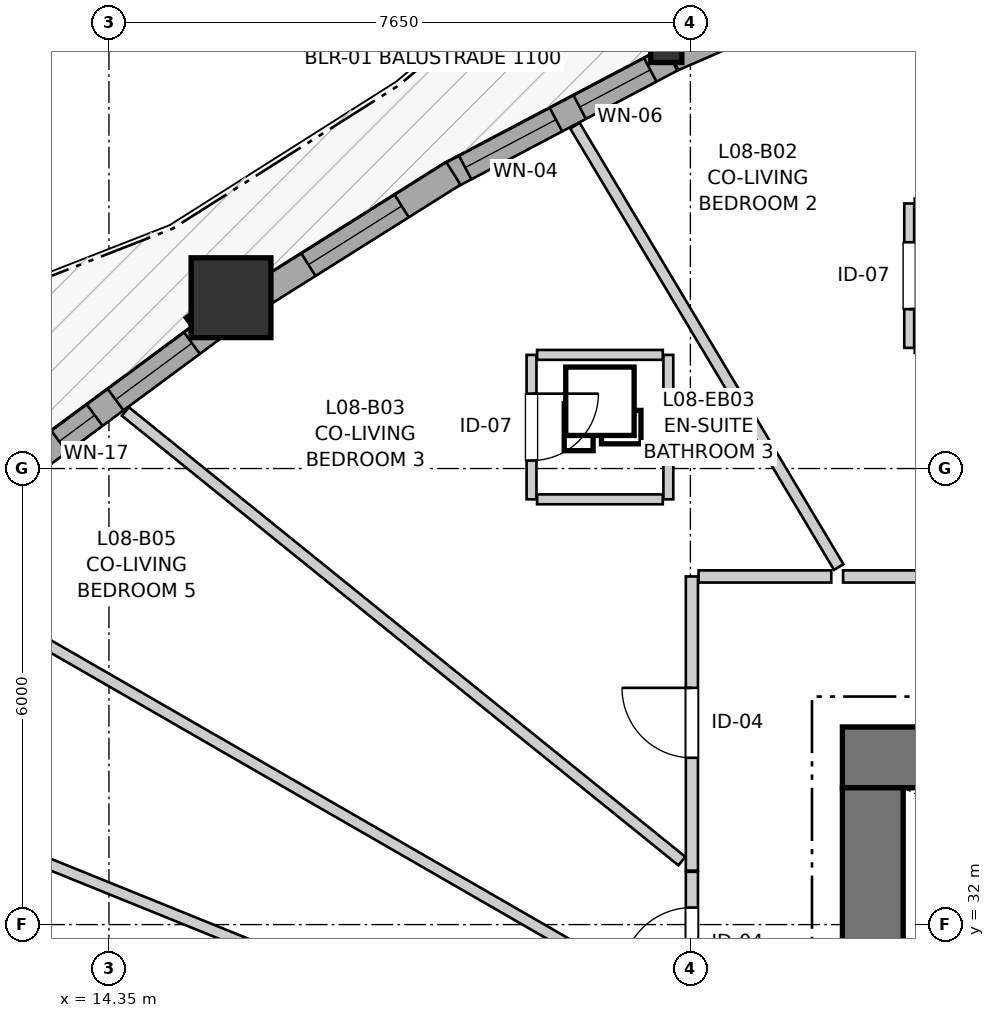
"""IFC4 building model, lengths in metres.
Left out: names, types, materials, properties, quantities, classifications, styles, units other than length and angle.
Written with IfcOpenShell. Run it as: python <this file> out.ifc"""

import sys

from ifc_helpers import new_model, si_unit, direction, frame, frame_2d, origin, origin_2d, place, context, subcontext, project, spatial, rectangle, i_section, extrude, source, transform, mapped, element, fill, save


model = new_model("IFC4")
c1 = context("Model", 3, precision=1e-05, world=origin(), true_north=direction((0.0, 1.0)))
c2 = subcontext(c1, "Body", "Model", "MODEL_VIEW")
j1 = project(units=[si_unit("LENGTHUNIT", "METRE"), si_unit("PLANEANGLEUNIT", "RADIAN")], contexts=[c1])
p1 = place(None, origin())
s1 = spatial("IfcSite", under=j1, at=p1, CompositionType="ELEMENT")
p2 = place(p1, origin())
s2 = spatial("IfcBuilding", under=s1, at=p2, CompositionType="ELEMENT")
p3 = place(p2, frame((0.0, 0.0, 30.2)))
s3 = spatial("IfcBuildingStorey", under=s2, at=p3, CompositionType="ELEMENT", Elevation=30.2)
p4 = place(p3, frame((36.7, 34.2, 0.0), z_axis=(0.0, 0.0, 1.0), x_axis=(-1.0, 0.0, 0.0)))
e1 = element("IfcWall", 1, at=p4, inside=s3, PredefinedType="SHEAR", context=c2, shape_type="SweptSolid", body=[
    extrude(rectangle(XDim=12.7, YDim=0.8, at=frame_2d((6.35, 0.0))), origin(), (0.0, 0.0, 1.0), 2.935),
])
p5 = place(p3, frame((24.4, 33.8, 0.0), z_axis=(0.0, 0.0, 1.0), x_axis=(0.0, -1.0, 0.0)))
e2 = element("IfcWall", 2, at=p5, inside=s3, PredefinedType="SHEAR", context=c2, shape_type="SweptSolid", body=[
    extrude(rectangle(XDim=15.6, YDim=0.8, at=frame_2d((7.8, 0.0))), origin(), (0.0, 0.0, 1.0), 2.935),
])
p6 = place(p5, frame((7.05, 0.0, 0.0)))
e3 = element("IfcOpeningElement", 3, at=p6, cuts=e2, PredefinedType="OPENING", context=c2, shape_type="SweptSolid", body=[
    extrude(rectangle(XDim=1.5, YDim=2.15, at=frame_2d((0.75, 1.075))), frame((0.0, 0.41, 0.0), z_axis=(0.0, -1.0, 0.0), x_axis=(1.0, 0.0, 0.0)), (0.0, 0.0, 1.0), 0.82),
])
p7 = place(p5, frame((3.52, 0.0, 0.0)))
e4 = element("IfcOpeningElement", 4, at=p7, cuts=e2, PredefinedType="OPENING", context=c2, shape_type="SweptSolid", body=[
    extrude(rectangle(XDim=0.86, YDim=2.05, at=frame_2d((0.43, 1.025))), frame((0.0, 0.41, 0.0), z_axis=(0.0, -1.0, 0.0), x_axis=(1.0, 0.0, 0.0)), (0.0, 0.0, 1.0), 0.82),
])
p8 = place(p5, frame((11.22, 0.0, 0.0)))
e5 = element("IfcOpeningElement", 5, at=p8, cuts=e2, PredefinedType="OPENING", context=c2, shape_type="SweptSolid", body=[
    extrude(rectangle(XDim=0.86, YDim=2.05, at=frame_2d((0.43, 1.025))), frame((0.0, 0.41, 0.0), z_axis=(0.0, -1.0, 0.0), x_axis=(1.0, 0.0, 0.0)), (0.0, 0.0, 1.0), 0.82),
])
m1 = source(origin(), c2, "Body", "SweptSolid", [
    extrude(i_section(OverallWidth=0.409, OverallDepth=0.425, WebThickness=0.03, FlangeThickness=0.048, FilletRadius=0.015, at=origin_2d()), origin(), (0.0, 0.0, 1.0), 2.935),
])
p9 = place(p3, frame((21.683, 43.554, 0.0), z_axis=(0.0, 0.0, 1.0), x_axis=(1.0, 0.0, 0.0)))
e6 = element("IfcColumn", 6, at=p9, inside=s3, PredefinedType="PILASTER", context=c2, shape_type="MappedRepresentation", body=[
    mapped(m1, transform((0.0, 0.0, 0.0), x_axis=(1.0, 0.0, 0.0), y_axis=(0.0, 1.0, 0.0), z_axis=(0.0, 0.0, 1.0), scale=1.0)),
])
m2 = source(origin(), c2, "Body", "SweptSolid", [
    extrude(rectangle(XDim=1.05, YDim=1.05, at=origin_2d()), origin(), (0.0, 0.0, 1.0), 2.935),
])
p10 = place(p3, frame((15.956, 40.247, 0.0), z_axis=(0.0, 0.0, 1.0), x_axis=(1.0, 0.0, 0.0)))
e7 = element("IfcColumn", 7, at=p10, inside=s3, PredefinedType="COLUMN", context=c2, shape_type="MappedRepresentation", body=[
    mapped(m2, transform((0.0, 0.0, 0.0), x_axis=(1.0, 0.0, 0.0), y_axis=(0.0, 1.0, 0.0), z_axis=(0.0, 0.0, 1.0), scale=1.0)),
])
p11 = place(p3, frame((24.84, 44.735, 0.0), z_axis=(0.0, 0.0, 1.0), x_axis=(-0.917090935142, -0.398678086532, 0.0)))
e8 = element("IfcWall", 8, at=p11, inside=s3, PredefinedType="SOLIDWALL", context=c2, shape_type="SweptSolid", body=[
    extrude(rectangle(XDim=3.346, YDim=0.35, at=frame_2d((1.673, 0.0))), origin(), (0.0, 0.0, 1.0), 2.415),
])
p12 = place(p11, frame((1.108, 0.0, 0.82)))
e9 = element("IfcOpeningElement", 9, at=p12, cuts=e8, PredefinedType="OPENING", context=c2, shape_type="SweptSolid", body=[
    extrude(rectangle(XDim=1.15, YDim=1.2, at=frame_2d((0.575, 0.6))), frame((0.0, 0.185, 0.0), z_axis=(0.0, -1.0, 0.0), x_axis=(1.0, 0.0, 0.0)), (0.0, 0.0, 1.0), 0.37),
])
p13 = place(p3, frame((21.747, 43.39, 0.0), z_axis=(0.0, 0.0, 1.0), x_axis=(-0.88437802144, -0.46677137358, 0.0)))
e10 = element("IfcWall", 10, at=p13, inside=s3, PredefinedType="SOLIDWALL", context=c2, shape_type="SweptSolid", body=[
    extrude(rectangle(XDim=3.327, YDim=0.35, at=frame_2d((1.664, 0.0))), origin(), (0.0, 0.0, 1.0), 2.415),
])
p14 = place(p13, frame((0.311, 0.0, 0.82)))
e11 = element("IfcOpeningElement", 11, at=p14, cuts=e10, PredefinedType="OPENING", context=c2, shape_type="SweptSolid", body=[
    extrude(rectangle(XDim=1.05, YDim=1.45, at=frame_2d((0.525, 0.725))), frame((0.0, 0.185, 0.0), z_axis=(0.0, -1.0, 0.0), x_axis=(1.0, 0.0, 0.0)), (0.0, 0.0, 1.0), 0.37),
])
p15 = place(p13, frame((1.714, 0.0, 0.82)))
e12 = element("IfcOpeningElement", 12, at=p15, cuts=e10, PredefinedType="OPENING", context=c2, shape_type="SweptSolid", body=[
    extrude(rectangle(XDim=1.35, YDim=1.45, at=frame_2d((0.675, 0.725))), frame((0.0, 0.185, 0.0), z_axis=(0.0, -1.0, 0.0), x_axis=(1.0, 0.0, 0.0)), (0.0, 0.0, 1.0), 0.37),
])
p16 = place(p3, frame((18.882, 41.882, 0.0), z_axis=(0.0, 0.0, 1.0), x_axis=(-0.846428134238, -0.53250297048, 0.0)))
e13 = element("IfcWall", 13, at=p16, inside=s3, PredefinedType="SOLIDWALL", context=c2, shape_type="SweptSolid", body=[
    extrude(rectangle(XDim=3.047, YDim=0.35, at=frame_2d((1.523, 0.0))), origin(), (0.0, 0.0, 1.0), 2.415),
])
p17 = place(p16, frame((0.803, 0.0, 0.82)))
e14 = element("IfcOpeningElement", 14, at=p17, cuts=e13, PredefinedType="OPENING", context=c2, shape_type="SweptSolid", body=[
    extrude(rectangle(XDim=1.45, YDim=1.25, at=frame_2d((0.725, 0.625))), frame((0.0, 0.185, 0.0), z_axis=(0.0, -1.0, 0.0), x_axis=(1.0, 0.0, 0.0)), (0.0, 0.0, 1.0), 0.37),
])
p18 = place(p3, frame((15.819, 39.928, 0.0), z_axis=(0.0, 0.0, 1.0), x_axis=(-0.803825144674, -0.594865645999, 0.0)))
e15 = element("IfcWall", 15, at=p18, inside=s3, PredefinedType="SOLIDWALL", context=c2, shape_type="SweptSolid", body=[
    extrude(rectangle(XDim=3.066, YDim=0.35, at=frame_2d((1.533, 0.0))), origin(), (0.0, 0.0, 1.0), 2.415),
])
p19 = place(p18, frame((0.469, 0.0, 0.82)))
e16 = element("IfcOpeningElement", 16, at=p19, cuts=e15, PredefinedType="OPENING", context=c2, shape_type="SweptSolid", body=[
    extrude(rectangle(XDim=1.25, YDim=1.35, at=frame_2d((0.625, 0.675))), frame((0.0, 0.185, 0.0), z_axis=(0.0, -1.0, 0.0), x_axis=(1.0, 0.0, 0.0)), (0.0, 0.0, 1.0), 0.37),
])
p20 = place(p18, frame((2.062, 0.0, 0.82)))
e17 = element("IfcOpeningElement", 17, at=p20, cuts=e15, PredefinedType="OPENING", context=c2, shape_type="SweptSolid", body=[
    extrude(rectangle(XDim=0.58, YDim=1.35, at=frame_2d((0.29, 0.675))), frame((0.0, 0.185, 0.0), z_axis=(0.0, -1.0, 0.0), x_axis=(1.0, 0.0, 0.0)), (0.0, 0.0, 1.0), 0.37),
])
p21 = place(p3, frame((22.02, 32.71, 0.0), z_axis=(0.0, 0.0, 1.0), x_axis=(0.0, 1.0, 0.0)))
e18 = element("IfcWall", 18, at=p21, inside=s3, PredefinedType="PARTITIONING", context=c2, shape_type="SweptSolid", body=[
    extrude(rectangle(XDim=3.87, YDim=0.16, at=frame_2d((1.935, 0.0))), origin(), (0.0, 0.0, 1.0), 2.935),
])
p22 = place(p21, frame((1.485, 0.0, 0.0)))
e19 = element("IfcOpeningElement", 19, at=p22, cuts=e18, PredefinedType="OPENING", context=c2, shape_type="SweptSolid", body=[
    extrude(rectangle(XDim=0.92, YDim=2.1, at=frame_2d((0.46, 1.05))), frame((0.0, 0.09, 0.0), z_axis=(0.0, -1.0, 0.0), x_axis=(1.0, 0.0, 0.0)), (0.0, 0.0, 1.0), 0.18),
])
p23 = place(p3, frame((24.009, 36.58, 0.0), z_axis=(0.0, 0.0, 1.0), x_axis=(1.0, 0.0, 0.0)))
e20 = element("IfcWall", 20, at=p23, inside=s3, PredefinedType="PARTITIONING", context=c2, shape_type="SweptSolid", body=[
    extrude(rectangle(XDim=3.822, YDim=0.16, at=frame_2d((1.911, 0.0))), origin(), (0.0, 0.0, 1.0), 2.543),
])
p24 = place(p23, frame((1.452, 0.0, 0.0)))
e21 = element("IfcOpeningElement", 21, at=p24, cuts=e20, PredefinedType="OPENING", context=c2, shape_type="SweptSolid", body=[
    extrude(rectangle(XDim=0.92, YDim=2.1, at=frame_2d((0.46, 1.05))), frame((0.0, 0.09, 0.0), z_axis=(0.0, -1.0, 0.0), x_axis=(1.0, 0.0, 0.0)), (0.0, 0.0, 1.0), 0.18),
])
p25 = place(p3, frame((22.02, 30.782, 0.0), z_axis=(0.0, 0.0, 1.0), x_axis=(0.0, 1.0, 0.0)))
e22 = element("IfcWall", 22, at=p25, inside=s3, PredefinedType="PARTITIONING", context=c2, shape_type="SweptSolid", body=[
    extrude(rectangle(XDim=1.913, YDim=0.16, at=frame_2d((0.957, 0.0))), origin(), (0.0, 0.0, 1.0), 2.935),
])
p26 = place(p25, frame((0.522, 0.0, 0.0)))
e23 = element("IfcOpeningElement", 23, at=p26, cuts=e22, PredefinedType="OPENING", context=c2, shape_type="SweptSolid", body=[
    extrude(rectangle(XDim=0.92, YDim=2.1, at=frame_2d((0.46, 1.05))), frame((0.0, 0.09, 0.0), z_axis=(0.0, -1.0, 0.0), x_axis=(1.0, 0.0, 0.0)), (0.0, 0.0, 1.0), 0.18),
])
p27 = place(p3, frame((24.879, 41.487, 0.0), z_axis=(0.0, 0.0, 1.0), x_axis=(0.0, -1.0, 0.0)))
e24 = element("IfcWall", 24, at=p27, inside=s3, PredefinedType="PARTITIONING", context=c2, shape_type="SweptSolid", body=[
    extrude(rectangle(XDim=1.9, YDim=0.13, at=frame_2d((0.95, 0.0))), origin(), (0.0, 0.0, 1.0), 2.935),
])
p28 = place(p27, frame((0.51, 0.0, 0.0)))
e25 = element("IfcOpeningElement", 25, at=p28, cuts=e24, PredefinedType="OPENING", context=c2, shape_type="SweptSolid", body=[
    extrude(rectangle(XDim=0.88, YDim=2.05, at=frame_2d((0.44, 1.025))), frame((0.0, 0.075, 0.0), z_axis=(0.0, -1.0, 0.0), x_axis=(1.0, 0.0, 0.0)), (0.0, 0.0, 1.0), 0.15),
])
p29 = place(p3, frame((19.91, 39.495, 0.0), z_axis=(0.0, 0.0, 1.0), x_axis=(0.0, -1.0, 0.0)))
e26 = element("IfcWall", 26, at=p29, inside=s3, PredefinedType="PARTITIONING", context=c2, shape_type="SweptSolid", body=[
    extrude(rectangle(XDim=1.9, YDim=0.13, at=frame_2d((0.95, 0.0))), origin(), (0.0, 0.0, 1.0), 2.935),
])
p30 = place(p29, frame((0.51, 0.0, 0.0)))
e27 = element("IfcOpeningElement", 27, at=p30, cuts=e26, PredefinedType="OPENING", context=c2, shape_type="SweptSolid", body=[
    extrude(rectangle(XDim=0.88, YDim=2.05, at=frame_2d((0.44, 1.025))), frame((0.0, 0.075, 0.0), z_axis=(0.0, -1.0, 0.0), x_axis=(1.0, 0.0, 0.0)), (0.0, 0.0, 1.0), 0.15),
])
p31 = place(p3, frame((9.577, 34.41, 0.0), z_axis=(0.0, 0.0, 1.0), x_axis=(0.926920362809, -0.375258099194, 0.0)))
e28 = element("IfcWall", 28, at=p31, inside=s3, PredefinedType="PARTITIONING", context=c2, shape_type="SweptSolid", body=[
    extrude(rectangle(XDim=13.3, YDim=0.145, at=frame_2d((6.65, 0.0))), origin(), (0.0, 0.0, 1.0), 2.935),
])
p32 = place(p3, frame((11.92, 36.618, 0.0), z_axis=(0.0, 0.0, 1.0), x_axis=(0.866473494239, -0.499223080177, 0.0)))
e29 = element("IfcWall", 29, at=p32, inside=s3, PredefinedType="PARTITIONING", context=c2, shape_type="SweptSolid", body=[
    extrude(rectangle(XDim=11.514, YDim=0.145, at=frame_2d((5.757, 0.0))), origin(), (0.0, 0.0, 1.0), 2.935),
])
p33 = place(p3, frame((14.566, 38.751, 0.0), z_axis=(0.0, 0.0, 1.0), x_axis=(0.777881688073, -0.628410756879, 0.0)))
e30 = element("IfcWall", 30, at=p33, inside=s3, PredefinedType="PARTITIONING", context=c2, shape_type="SweptSolid", body=[
    extrude(rectangle(XDim=9.413, YDim=0.145, at=frame_2d((4.707, 0.0))), origin(), (0.0, 0.0, 1.0), 2.935),
])
p34 = place(p3, frame((20.481, 42.51, 0.0), z_axis=(0.0, 0.0, 1.0), x_axis=(0.513067331262, -0.858348363773, 0.0)))
e31 = element("IfcWall", 31, at=p34, inside=s3, PredefinedType="PARTITIONING", context=c2, shape_type="SweptSolid", body=[
    extrude(rectangle(XDim=6.765, YDim=0.145, at=frame_2d((3.382, 0.0))), origin(), (0.0, 0.0, 1.0), 2.935),
])
p35 = place(p3, frame((22.108, 36.58, 0.0), z_axis=(0.0, 0.0, 1.0), x_axis=(1.0, 0.0, 0.0)))
e32 = element("IfcWall", 32, at=p35, inside=s3, PredefinedType="PARTITIONING", context=c2, shape_type="SweptSolid", body=[
    extrude(rectangle(XDim=1.746, YDim=0.16, at=frame_2d((0.873, 0.0))), origin(), (0.0, 0.0, 1.0), 2.543),
])
p36 = place(p3, frame((21.71, 37.595, 0.0), z_axis=(0.0, 0.0, 1.0), x_axis=(0.0, 1.0, 0.0)))
e33 = element("IfcWall", 33, at=p36, inside=s3, PredefinedType="PARTITIONING", context=c2, shape_type="SweptSolid", body=[
    extrude(rectangle(XDim=1.9, YDim=0.13, at=frame_2d((0.95, 0.0))), origin(), (0.0, 0.0, 1.0), 2.935),
])
for number, where, z_axis, x_axis in (
    (34, (19.983, 39.495, 0.0), (0.0, 0.0, 1.0), (1.0, 0.0, 0.0)),
    (35, (19.983, 37.595, 0.0), (0.0, 0.0, 1.0), (1.0, 0.0, 0.0)),
):
    element("IfcWall", number, at=place(p3, frame(where, z_axis=z_axis, x_axis=x_axis)), inside=s3, PredefinedType="PARTITIONING", context=c2, shape_type="SweptSolid", body=[
        extrude(rectangle(XDim=1.654, YDim=0.13, at=frame_2d((0.827, 0.0))), origin(), (0.0, 0.0, 1.0), 2.935),
    ])
p37 = place(p3, frame((24.952, 39.587, 0.0), z_axis=(0.0, 0.0, 1.0), x_axis=(1.0, 0.0, 0.0)))
e36 = element("IfcWall", 36, at=p37, inside=s3, PredefinedType="PARTITIONING", context=c2, shape_type="SweptSolid", body=[
    extrude(rectangle(XDim=1.727, YDim=0.13, at=frame_2d((0.864, 0.0))), origin(), (0.0, 0.0, 1.0), 2.935),
])
p38 = place(p3, frame((24.952, 41.487, 0.0), z_axis=(0.0, 0.0, 1.0), x_axis=(1.0, 0.0, 0.0)))
e37 = element("IfcWall", 37, at=p38, inside=s3, PredefinedType="PARTITIONING", context=c2, shape_type="SweptSolid", body=[
    extrude(rectangle(XDim=1.59, YDim=0.13, at=frame_2d((0.795, 0.0))), origin(), (0.0, 0.0, 1.0), 2.503),
])
m3 = source(origin(), c2, "Body", "SweptSolid", [
    extrude(rectangle(XDim=1.05, YDim=1.45, at=frame_2d((0.525, 0.725))), frame((0.0, 0.03, 0.0), z_axis=(0.0, -1.0, 0.0), x_axis=(1.0, 0.0, 0.0)), (0.0, 0.0, 1.0), 0.06),
])
p39 = place(p14, origin())
e38 = element("IfcWindow", 38, at=p39, inside=s3, PartitioningType="SINGLE_PANEL", PredefinedType="WINDOW", context=c2, shape_type="MappedRepresentation", body=[
    mapped(m3, transform((0.0, 0.0, 0.0), x_axis=(1.0, 0.0, 0.0), y_axis=(0.0, 1.0, 0.0), z_axis=(0.0, 0.0, 1.0), scale=1.0)),
])
fill(e11, e38)
m4 = source(origin(), c2, "Body", "SweptSolid", [
    extrude(rectangle(XDim=1.35, YDim=1.45, at=frame_2d((0.675, 0.725))), frame((0.0, 0.03, 0.0), z_axis=(0.0, -1.0, 0.0), x_axis=(1.0, 0.0, 0.0)), (0.0, 0.0, 1.0), 0.06),
])
p40 = place(p15, origin())
e39 = element("IfcWindow", 39, at=p40, inside=s3, PartitioningType="SINGLE_PANEL", PredefinedType="WINDOW", context=c2, shape_type="MappedRepresentation", body=[
    mapped(m4, transform((0.0, 0.0, 0.0), x_axis=(1.0, 0.0, 0.0), y_axis=(0.0, 1.0, 0.0), z_axis=(0.0, 0.0, 1.0), scale=1.0)),
])
fill(e12, e39)
m5 = source(origin(), c2, "Body", "SweptSolid", [
    extrude(rectangle(XDim=1.45, YDim=1.25, at=frame_2d((0.725, 0.625))), frame((0.0, 0.03, 0.0), z_axis=(0.0, -1.0, 0.0), x_axis=(1.0, 0.0, 0.0)), (0.0, 0.0, 1.0), 0.06),
])
p41 = place(p17, origin())
e40 = element("IfcWindow", 40, at=p41, inside=s3, PartitioningType="SINGLE_PANEL", PredefinedType="WINDOW", context=c2, shape_type="MappedRepresentation", body=[
    mapped(m5, transform((0.0, 0.0, 0.0), x_axis=(1.0, 0.0, 0.0), y_axis=(0.0, 1.0, 0.0), z_axis=(0.0, 0.0, 1.0), scale=1.0)),
])
fill(e14, e40)
m6 = source(origin(), c2, "Body", "SweptSolid", [
    extrude(rectangle(XDim=1.25, YDim=1.35, at=frame_2d((0.625, 0.675))), frame((0.0, 0.03, 0.0), z_axis=(0.0, -1.0, 0.0), x_axis=(1.0, 0.0, 0.0)), (0.0, 0.0, 1.0), 0.06),
])
p42 = place(p19, origin())
e41 = element("IfcWindow", 41, at=p42, inside=s3, PartitioningType="SINGLE_PANEL", PredefinedType="WINDOW", context=c2, shape_type="MappedRepresentation", body=[
    mapped(m6, transform((0.0, 0.0, 0.0), x_axis=(1.0, 0.0, 0.0), y_axis=(0.0, 1.0, 0.0), z_axis=(0.0, 0.0, 1.0), scale=1.0)),
])
fill(e16, e41)
m7 = source(origin(), c2, "Body", "SweptSolid", [
    extrude(rectangle(XDim=0.58, YDim=1.35, at=frame_2d((0.29, 0.675))), frame((0.0, 0.03, 0.0), z_axis=(0.0, -1.0, 0.0), x_axis=(1.0, 0.0, 0.0)), (0.0, 0.0, 1.0), 0.06),
])
p43 = place(p20, origin())
e42 = element("IfcWindow", 42, at=p43, inside=s3, PartitioningType="SINGLE_PANEL", PredefinedType="WINDOW", context=c2, shape_type="MappedRepresentation", body=[
    mapped(m7, transform((0.0, 0.0, 0.0), x_axis=(1.0, 0.0, 0.0), y_axis=(0.0, 1.0, 0.0), z_axis=(0.0, 0.0, 1.0), scale=1.0)),
])
fill(e17, e42)
m8 = source(origin(), c2, "Body", "SweptSolid", [
    extrude(rectangle(XDim=0.92, YDim=2.1, at=frame_2d((0.46, 1.05))), frame((0.0, 0.025, 0.0), z_axis=(0.0, -1.0, 0.0), x_axis=(1.0, 0.0, 0.0)), (0.0, 0.0, 1.0), 0.05),
])
p44 = place(p22, origin())
e43 = element("IfcDoor", 43, at=p44, inside=s3, OperationType="SINGLE_SWING_RIGHT", PredefinedType="DOOR", context=c2, shape_type="MappedRepresentation", body=[
    mapped(m8, transform((0.0, 0.0, 0.0), x_axis=(1.0, 0.0, 0.0), y_axis=(0.0, 1.0, 0.0), z_axis=(0.0, 0.0, 1.0), scale=1.0)),
])
fill(e19, e43)
p45 = place(p26, origin())
e44 = element("IfcDoor", 44, at=p45, inside=s3, OperationType="SINGLE_SWING_LEFT", PredefinedType="DOOR", context=c2, shape_type="MappedRepresentation", body=[
    mapped(m8, transform((0.0, 0.0, 0.0), x_axis=(1.0, 0.0, 0.0), y_axis=(0.0, 1.0, 0.0), z_axis=(0.0, 0.0, 1.0), scale=1.0)),
])
fill(e23, e44)
m9 = source(origin(), c2, "Body", "SweptSolid", [
    extrude(rectangle(XDim=0.88, YDim=2.05, at=frame_2d((0.44, 1.025))), frame((0.0, 0.025, 0.0), z_axis=(0.0, -1.0, 0.0), x_axis=(1.0, 0.0, 0.0)), (0.0, 0.0, 1.0), 0.05),
])
p46 = place(p28, origin())
e45 = element("IfcDoor", 45, at=p46, inside=s3, OperationType="SINGLE_SWING_RIGHT", PredefinedType="DOOR", context=c2, shape_type="MappedRepresentation", body=[
    mapped(m9, transform((0.0, 0.0, 0.0), x_axis=(1.0, 0.0, 0.0), y_axis=(0.0, 1.0, 0.0), z_axis=(0.0, 0.0, 1.0), scale=1.0)),
])
fill(e25, e45)
p47 = place(p30, origin())
e46 = element("IfcDoor", 46, at=p47, inside=s3, OperationType="SINGLE_SWING_LEFT", PredefinedType="DOOR", context=c2, shape_type="MappedRepresentation", body=[
    mapped(m9, transform((0.0, 0.0, 0.0), x_axis=(1.0, 0.0, 0.0), y_axis=(0.0, 1.0, 0.0), z_axis=(0.0, 0.0, 1.0), scale=1.0)),
])
fill(e27, e46)
save(model, sys.argv[1])
